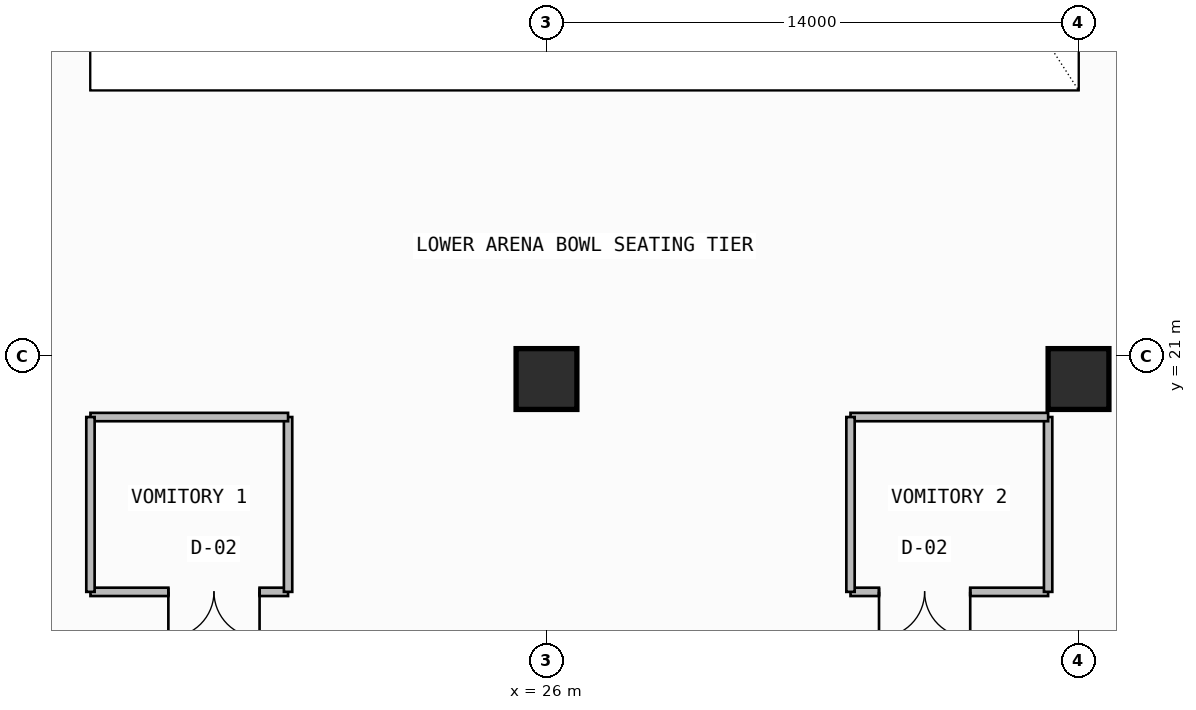
"""IFC4 building model, lengths in metres.
Left out: names, types, materials, properties, quantities, classifications, styles, units other than length and angle.
Written with IfcOpenShell. Run it as: python <this file> out.ifc"""

import sys

from ifc_helpers import new_model, si_unit, direction, frame, frame_2d, origin, origin_2d, place, context, subcontext, project, spatial, rectangle, extrude, element, fill, save


model = new_model("IFC4")
c1 = context("Model", 3, precision=1e-05, world=origin(), true_north=direction((0.0, 1.0)))
c2 = subcontext(c1, "Body", "Model", "MODEL_VIEW")
j1 = project(units=[si_unit("LENGTHUNIT", "METRE"), si_unit("PLANEANGLEUNIT", "RADIAN")], contexts=[c1])
p1 = place(None, origin())
s1 = spatial("IfcSite", under=j1, at=p1, CompositionType="ELEMENT")
p2 = place(p1, origin())
s2 = spatial("IfcBuilding", under=s1, at=p2, CompositionType="ELEMENT")
p3 = place(p2, frame((0.0, 0.0, 4.5)))
s3 = spatial("IfcBuildingStorey", under=s2, at=p3, CompositionType="ELEMENT", Elevation=4.5)
for number, where, z_axis, x_axis in (
    (1, (26.0, 20.4, 0.0), (0.0, 0.0, 1.0), (1.0, 0.0, 0.0)),
    (2, (40.0, 20.4, 0.0), (0.0, 0.0, 1.0), (1.0, 0.0, 0.0)),
):
    element("IfcColumn", number, at=place(p3, frame(where, z_axis=z_axis, x_axis=x_axis)), inside=s3, PredefinedType="COLUMN", context=c2, shape_type="SweptSolid", body=[
        extrude(rectangle(XDim=1.6, YDim=1.6, at=origin_2d()), origin(), (0.0, 0.0, 1.0), 4.5),
    ])
p4 = place(p3, frame((14.0, 14.8, 0.0), z_axis=(0.0, 0.0, 1.0), x_axis=(1.0, 0.0, 0.0)))
e3 = element("IfcWall", 3, at=p4, inside=s3, PredefinedType="SOLIDWALL", context=c2, shape_type="SweptSolid", body=[
    extrude(rectangle(XDim=5.2, YDim=0.22, at=frame_2d((2.6, 0.0))), origin(), (0.0, 0.0, 1.0), 3.665),
])
p5 = place(p4, frame((2.05, 0.0, 0.0)))
e4 = element("IfcOpeningElement", 4, at=p5, cuts=e3, PredefinedType="OPENING", context=c2, shape_type="SweptSolid", body=[
    extrude(rectangle(XDim=2.4, YDim=2.4, at=frame_2d((1.2, 1.2))), frame((0.0, 0.12, 0.0), z_axis=(0.0, -1.0, 0.0), x_axis=(1.0, 0.0, 0.0)), (0.0, 0.0, 1.0), 0.24),
])
p6 = place(p3, frame((19.2, 14.8, 0.0), z_axis=(0.0, 0.0, 1.0), x_axis=(0.0, 1.0, 0.0)))
e5 = element("IfcWall", 5, at=p6, inside=s3, PredefinedType="SOLIDWALL", context=c2, shape_type="SweptSolid", body=[
    extrude(rectangle(XDim=4.6, YDim=0.22, at=frame_2d((2.3, 0.0))), origin(), (0.0, 0.0, 1.0), 3.665),
])
p7 = place(p3, frame((19.2, 19.4, 0.0), z_axis=(0.0, 0.0, 1.0), x_axis=(-1.0, 0.0, 0.0)))
e6 = element("IfcWall", 6, at=p7, inside=s3, PredefinedType="SOLIDWALL", context=c2, shape_type="SweptSolid", body=[
    extrude(rectangle(XDim=5.2, YDim=0.22, at=frame_2d((2.6, 0.0))), origin(), (0.0, 0.0, 1.0), 3.665),
])
p8 = place(p3, frame((14.0, 19.4, 0.0), z_axis=(0.0, 0.0, 1.0), x_axis=(0.0, -1.0, 0.0)))
e7 = element("IfcWall", 7, at=p8, inside=s3, PredefinedType="SOLIDWALL", context=c2, shape_type="SweptSolid", body=[
    extrude(rectangle(XDim=4.6, YDim=0.22, at=frame_2d((2.3, 0.0))), origin(), (0.0, 0.0, 1.0), 4.18),
])
p9 = place(p3, frame((34.0, 14.8, 0.0), z_axis=(0.0, 0.0, 1.0), x_axis=(1.0, 0.0, 0.0)))
e8 = element("IfcWall", 8, at=p9, inside=s3, PredefinedType="SOLIDWALL", context=c2, shape_type="SweptSolid", body=[
    extrude(rectangle(XDim=5.2, YDim=0.22, at=frame_2d((2.6, 0.0))), origin(), (0.0, 0.0, 1.0), 4.18),
])
p10 = place(p9, frame((0.75, 0.0, 0.0)))
e9 = element("IfcOpeningElement", 9, at=p10, cuts=e8, PredefinedType="OPENING", context=c2, shape_type="SweptSolid", body=[
    extrude(rectangle(XDim=2.4, YDim=2.4, at=frame_2d((1.2, 1.2))), frame((0.0, 0.12, 0.0), z_axis=(0.0, -1.0, 0.0), x_axis=(1.0, 0.0, 0.0)), (0.0, 0.0, 1.0), 0.24),
])
p11 = place(p3, frame((39.2, 14.8, 0.0), z_axis=(0.0, 0.0, 1.0), x_axis=(0.0, 1.0, 0.0)))
e10 = element("IfcWall", 10, at=p11, inside=s3, PredefinedType="SOLIDWALL", context=c2, shape_type="SweptSolid", body=[
    extrude(rectangle(XDim=4.6, YDim=0.22, at=frame_2d((2.3, 0.0))), origin(), (0.0, 0.0, 1.0), 4.18),
])
p12 = place(p3, frame((39.2, 19.4, 0.0), z_axis=(0.0, 0.0, 1.0), x_axis=(-1.0, 0.0, 0.0)))
e11 = element("IfcWall", 11, at=p12, inside=s3, PredefinedType="SOLIDWALL", context=c2, shape_type="SweptSolid", body=[
    extrude(rectangle(XDim=5.2, YDim=0.22, at=frame_2d((2.6, 0.0))), origin(), (0.0, 0.0, 1.0), 4.18),
])
p13 = place(p3, frame((34.0, 19.4, 0.0), z_axis=(0.0, 0.0, 1.0), x_axis=(0.0, -1.0, 0.0)))
e12 = element("IfcWall", 12, at=p13, inside=s3, PredefinedType="SOLIDWALL", context=c2, shape_type="SweptSolid", body=[
    extrude(rectangle(XDim=4.6, YDim=0.22, at=frame_2d((2.3, 0.0))), origin(), (0.0, 0.0, 1.0), 4.18),
])
p14 = place(p5, frame((2.4, 0.0, 0.0), z_axis=(0.0, 0.0, 1.0), x_axis=(-1.0, 0.0, 0.0)))
e13 = element("IfcDoor", 13, at=p14, inside=s3, OperationType="DOUBLE_DOOR_SINGLE_SWING", PredefinedType="USERDEFINED", context=c2, shape_type="SweptSolid", body=[
    extrude(rectangle(XDim=2.4, YDim=2.4, at=frame_2d((1.2, 1.2))), frame((0.0, 0.025, 0.0), z_axis=(0.0, -1.0, 0.0), x_axis=(1.0, 0.0, 0.0)), (0.0, 0.0, 1.0), 0.05),
])
fill(e4, e13)
p15 = place(p10, frame((2.4, 0.0, 0.0), z_axis=(0.0, 0.0, 1.0), x_axis=(-1.0, 0.0, 0.0)))
e14 = element("IfcDoor", 14, at=p15, inside=s3, OperationType="DOUBLE_DOOR_SINGLE_SWING", PredefinedType="USERDEFINED", context=c2, shape_type="SweptSolid", body=[
    extrude(rectangle(XDim=2.4, YDim=2.4, at=frame_2d((1.2, 1.2))), frame((0.0, 0.025, 0.0), z_axis=(0.0, -1.0, 0.0), x_axis=(1.0, 0.0, 0.0)), (0.0, 0.0, 1.0), 0.05),
])
fill(e9, e14)
save(model, sys.argv[1])
